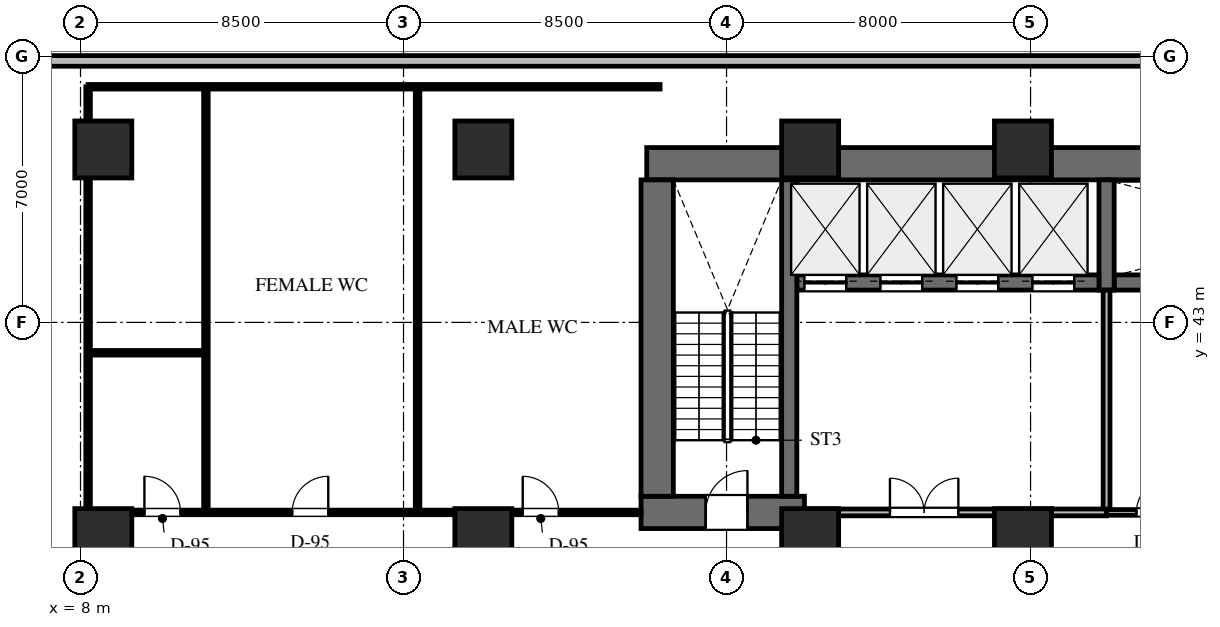
"""IFC4 building model, lengths in metres.
Left out: names, types, materials, properties, quantities, classifications, styles, units other than length and angle.
Written with IfcOpenShell. Run it as: python <this file> out.ifc"""

import sys

from ifc_helpers import new_model, si_unit, direction, frame, frame_2d, origin, origin_2d, place, context, subcontext, project, spatial, rectangle, extrude, element, fill, save


model = new_model("IFC4")
c1 = context("Model", 3, precision=1e-05, world=origin(), true_north=direction((0.0, 1.0)))
c2 = subcontext(c1, "Body", "Model", "MODEL_VIEW")
j1 = project(units=[si_unit("LENGTHUNIT", "METRE"), si_unit("PLANEANGLEUNIT", "RADIAN")], contexts=[c1])
p1 = place(None, origin())
s1 = spatial("IfcSite", under=j1, at=p1, CompositionType="ELEMENT")
p2 = place(p1, origin())
s2 = spatial("IfcBuilding", under=s1, at=p2, CompositionType="ELEMENT")
p3 = place(p2, frame((0.0, 0.0, 19.8)))
s3 = spatial("IfcBuildingStorey", under=s2, at=p3, CompositionType="ELEMENT", Elevation=19.8)
p4 = place(p3, frame((22.9, 47.175, 0.0), z_axis=(0.0, 0.0, 1.0), x_axis=(1.0, 0.0, 0.0)))
e1 = element("IfcWall", 1, at=p4, inside=s3, PredefinedType="SHEAR", context=c2, shape_type="SweptSolid", body=[
    extrude(rectangle(XDim=43.8, YDim=0.85, at=frame_2d((21.9, 0.0))), origin(), (0.0, 0.0, 1.0), 4.5),
])
p5 = place(p3, frame((35.2, 44.05, 0.0), z_axis=(0.0, 0.0, 1.0), x_axis=(1.0, 0.0, 0.0)))
e2 = element("IfcWall", 2, at=p5, inside=s3, PredefinedType="SHEAR", context=c2, shape_type="SweptSolid", body=[
    extrude(rectangle(XDim=9.65, YDim=0.4, at=frame_2d((4.825, 0.0))), origin(), (0.0, 0.0, 1.0), 4.5),
])
p6 = place(p3, frame((35.0, 43.85, 0.0), z_axis=(0.0, 0.0, 1.0), x_axis=(0.0, 1.0, 0.0)))
e3 = element("IfcWall", 3, at=p6, inside=s3, PredefinedType="SHEAR", context=c2, shape_type="SweptSolid", body=[
    extrude(rectangle(XDim=2.9, YDim=0.4, at=frame_2d((1.45, 0.0))), origin(), (0.0, 0.0, 1.0), 4.5),
])
p7 = place(p3, frame((26.85, 44.05, 0.0), z_axis=(0.0, 0.0, 1.0), x_axis=(1.0, 0.0, 0.0)))
e4 = element("IfcWall", 4, at=p7, inside=s3, PredefinedType="SHEAR", context=c2, shape_type="SweptSolid", body=[
    extrude(rectangle(XDim=7.95, YDim=0.4, at=frame_2d((3.975, 0.0))), origin(), (0.0, 0.0, 1.0), 4.5),
])
p8 = place(p7, frame((0.2, 0.0, 0.0)))
e5 = element("IfcOpeningElement", 5, at=p8, cuts=e4, PredefinedType="OPENING", context=c2, shape_type="SweptSolid", body=[
    extrude(rectangle(XDim=1.1, YDim=2.2, at=frame_2d((0.55, 1.1))), frame((0.0, 0.21, 0.0), z_axis=(0.0, -1.0, 0.0), x_axis=(1.0, 0.0, 0.0)), (0.0, 0.0, 1.0), 0.42),
])
p9 = place(p7, frame((2.2, 0.0, 0.0)))
e6 = element("IfcOpeningElement", 6, at=p9, cuts=e4, PredefinedType="OPENING", context=c2, shape_type="SweptSolid", body=[
    extrude(rectangle(XDim=1.1, YDim=2.2, at=frame_2d((0.55, 1.1))), frame((0.0, 0.21, 0.0), z_axis=(0.0, -1.0, 0.0), x_axis=(1.0, 0.0, 0.0)), (0.0, 0.0, 1.0), 0.42),
])
p10 = place(p7, frame((4.2, 0.0, 0.0)))
e7 = element("IfcOpeningElement", 7, at=p10, cuts=e4, PredefinedType="OPENING", context=c2, shape_type="SweptSolid", body=[
    extrude(rectangle(XDim=1.1, YDim=2.2, at=frame_2d((0.55, 1.1))), frame((0.0, 0.21, 0.0), z_axis=(0.0, -1.0, 0.0), x_axis=(1.0, 0.0, 0.0)), (0.0, 0.0, 1.0), 0.42),
])
p11 = place(p7, frame((6.2, 0.0, 0.0)))
e8 = element("IfcOpeningElement", 8, at=p11, cuts=e4, PredefinedType="OPENING", context=c2, shape_type="SweptSolid", body=[
    extrude(rectangle(XDim=1.1, YDim=2.2, at=frame_2d((0.55, 1.1))), frame((0.0, 0.21, 0.0), z_axis=(0.0, -1.0, 0.0), x_axis=(1.0, 0.0, 0.0)), (0.0, 0.0, 1.0), 0.42),
])
p12 = place(p3, frame((22.75, 38.0, 0.0), z_axis=(0.0, 0.0, 1.0), x_axis=(1.0, 0.0, 0.0)))
e9 = element("IfcWall", 9, at=p12, inside=s3, PredefinedType="SHEAR", context=c2, shape_type="SweptSolid", body=[
    extrude(rectangle(XDim=4.3, YDim=0.85, at=frame_2d((2.15, 0.0))), origin(), (0.0, 0.0, 1.0), 4.5),
])
p13 = place(p12, frame((1.7, 0.0, 0.0)))
e10 = element("IfcOpeningElement", 10, at=p13, cuts=e9, PredefinedType="OPENING", context=c2, shape_type="SweptSolid", body=[
    extrude(rectangle(XDim=1.1, YDim=2.2, at=frame_2d((0.55, 1.1))), frame((0.0, 0.435, 0.0), z_axis=(0.0, -1.0, 0.0), x_axis=(1.0, 0.0, 0.0)), (0.0, 0.0, 1.0), 0.87),
])
p14 = place(p3, frame((23.175, 38.425, 0.0), z_axis=(0.0, 0.0, 1.0), x_axis=(0.0, 1.0, 0.0)))
e11 = element("IfcWall", 11, at=p14, inside=s3, PredefinedType="SHEAR", context=c2, shape_type="SweptSolid", body=[
    extrude(rectangle(XDim=8.325, YDim=0.85, at=frame_2d((4.163, 0.0))), origin(), (0.0, 0.0, 1.0), 4.5),
])
p15 = place(p3, frame((26.65, 38.425, 0.0), z_axis=(0.0, 0.0, 1.0), x_axis=(0.0, 1.0, 0.0)))
e12 = element("IfcWall", 12, at=p15, inside=s3, PredefinedType="SHEAR", context=c2, shape_type="SweptSolid", body=[
    extrude(rectangle(XDim=8.325, YDim=0.4, at=frame_2d((4.163, 0.0))), origin(), (0.0, 0.0, 1.0), 4.5),
])
for number, where, z_axis, x_axis in (
    (13, (32.8, 37.35, 0.0), (0.0, 0.0, 1.0), (1.0, 0.0, 0.0)),
    (14, (32.8, 47.55, 0.0), (0.0, 0.0, 1.0), (1.0, 0.0, 0.0)),
    (15, (27.2, 37.35, 0.0), (0.0, 0.0, 1.0), (1.0, 0.0, 0.0)),
    (16, (27.2, 47.55, 0.0), (0.0, 0.0, 1.0), (1.0, 0.0, 0.0)),
    (17, (18.6, 37.35, 0.0), (0.0, 0.0, 1.0), (1.0, 0.0, 0.0)),
    (18, (18.6, 47.55, 0.0), (0.0, 0.0, 1.0), (1.0, 0.0, 0.0)),
    (19, (8.6, 37.35, 0.0), (0.0, 0.0, 1.0), (1.0, 0.0, 0.0)),
    (20, (8.6, 47.55, 0.0), (0.0, 0.0, 1.0), (1.0, 0.0, 0.0)),
):
    element("IfcColumn", number, at=place(p3, frame(where, z_axis=z_axis, x_axis=x_axis)), inside=s3, PredefinedType="COLUMN", context=c2, shape_type="SweptSolid", body=[
        extrude(rectangle(XDim=1.5, YDim=1.5, at=origin_2d()), origin(), (0.0, 0.0, 1.0), 4.5),
    ])
p16 = place(p3, frame((2.65, 49.88, 0.0), z_axis=(0.0, 0.0, 1.0), x_axis=(1.0, 0.0, 0.0)))
e21 = element("IfcWall", 21, at=p16, inside=s3, PredefinedType="STANDARD", context=c2, shape_type="SweptSolid", body=[
    extrude(rectangle(XDim=68.701, YDim=0.28, at=frame_2d((34.35, 0.0))), origin(), (0.0, 0.0, 1.0), 4.15),
])
p17 = place(p3, frame((35.0, 38.0, 0.0), z_axis=(0.0, 0.0, 1.0), x_axis=(0.0, 1.0, 0.0)))
e22 = element("IfcWall", 22, at=p17, inside=s3, PredefinedType="STANDARD", context=c2, shape_type="SweptSolid", body=[
    extrude(rectangle(XDim=5.85, YDim=0.18, at=frame_2d((2.925, 0.0))), origin(), (0.0, 0.0, 1.0), 4.15),
])
p18 = place(p3, frame((27.05, 38.0, 0.0), z_axis=(0.0, 0.0, 1.0), x_axis=(1.0, 0.0, 0.0)))
e23 = element("IfcWall", 23, at=p18, inside=s3, PredefinedType="STANDARD", context=c2, shape_type="SweptSolid", body=[
    extrude(rectangle(XDim=7.95, YDim=0.18, at=frame_2d((3.975, 0.0))), origin(), (0.0, 0.0, 1.0), 3.202),
])
p19 = place(p18, frame((2.25, 0.0, 0.0)))
e24 = element("IfcOpeningElement", 24, at=p19, cuts=e23, PredefinedType="OPENING", context=c2, shape_type="SweptSolid", body=[
    extrude(rectangle(XDim=1.8, YDim=2.2, at=frame_2d((0.9, 1.1))), frame((0.0, 0.1, 0.0), z_axis=(0.0, -1.0, 0.0), x_axis=(1.0, 0.0, 0.0)), (0.0, 0.0, 1.0), 0.2),
])
p20 = place(p3, frame((35.0, 38.0, 0.0), z_axis=(0.0, 0.0, 1.0), x_axis=(1.0, 0.0, 0.0)))
e25 = element("IfcWall", 25, at=p20, inside=s3, PredefinedType="PARTITIONING", context=c2, shape_type="SweptSolid", body=[
    extrude(rectangle(XDim=10.05, YDim=0.15, at=frame_2d((5.025, 0.0))), origin(), (0.0, 0.0, 1.0), 3.202),
])
p21 = place(p20, frame((0.785, 0.0, 0.0)))
e26 = element("IfcOpeningElement", 26, at=p21, cuts=e25, PredefinedType="OPENING", context=c2, shape_type="SweptSolid", body=[
    extrude(rectangle(XDim=0.9, YDim=2.1, at=frame_2d((0.45, 1.05))), frame((0.0, 0.085, 0.0), z_axis=(0.0, -1.0, 0.0), x_axis=(1.0, 0.0, 0.0)), (0.0, 0.0, 1.0), 0.17),
])
p22 = place(p20, frame((5.3, 0.0, 0.0)))
e27 = element("IfcOpeningElement", 27, at=p22, cuts=e25, PredefinedType="OPENING", context=c2, shape_type="SweptSolid", body=[
    extrude(rectangle(XDim=0.9, YDim=2.1, at=frame_2d((0.45, 1.05))), frame((0.0, 0.085, 0.0), z_axis=(0.0, -1.0, 0.0), x_axis=(1.0, 0.0, 0.0)), (0.0, 0.0, 1.0), 0.17),
])
p23 = place(p20, frame((7.2, 0.0, 0.0)))
e28 = element("IfcOpeningElement", 28, at=p23, cuts=e25, PredefinedType="OPENING", context=c2, shape_type="SweptSolid", body=[
    extrude(rectangle(XDim=0.9, YDim=2.1, at=frame_2d((0.45, 1.05))), frame((0.0, 0.085, 0.0), z_axis=(0.0, -1.0, 0.0), x_axis=(1.0, 0.0, 0.0)), (0.0, 0.0, 1.0), 0.17),
])
p24 = place(p3, frame((8.2, 38.0, 0.0), z_axis=(0.0, 0.0, 1.0), x_axis=(1.0, 0.0, 0.0)))
e29 = element("IfcWall", 29, at=p24, inside=s3, PredefinedType="PARTITIONING", context=c2, shape_type="SweptSolid", body=[
    extrude(rectangle(XDim=14.55, YDim=0.12, at=frame_2d((7.275, 0.0))), origin(), (0.0, 0.0, 1.0), 3.202),
])
p25 = place(p24, frame((1.482, 0.0, 0.0)))
e30 = element("IfcOpeningElement", 30, at=p25, cuts=e29, PredefinedType="OPENING", context=c2, shape_type="SweptSolid", body=[
    extrude(rectangle(XDim=0.95, YDim=2.15, at=frame_2d((0.475, 1.075))), frame((0.0, 0.07, 0.0), z_axis=(0.0, -1.0, 0.0), x_axis=(1.0, 0.0, 0.0)), (0.0, 0.0, 1.0), 0.14),
])
p26 = place(p24, frame((5.37, 0.0, 0.0)))
e31 = element("IfcOpeningElement", 31, at=p26, cuts=e29, PredefinedType="OPENING", context=c2, shape_type="SweptSolid", body=[
    extrude(rectangle(XDim=0.95, YDim=2.15, at=frame_2d((0.475, 1.075))), frame((0.0, 0.07, 0.0), z_axis=(0.0, -1.0, 0.0), x_axis=(1.0, 0.0, 0.0)), (0.0, 0.0, 1.0), 0.14),
])
p27 = place(p24, frame((11.437, 0.0, 0.0)))
e32 = element("IfcOpeningElement", 32, at=p27, cuts=e29, PredefinedType="OPENING", context=c2, shape_type="SweptSolid", body=[
    extrude(rectangle(XDim=0.95, YDim=2.15, at=frame_2d((0.475, 1.075))), frame((0.0, 0.07, 0.0), z_axis=(0.0, -1.0, 0.0), x_axis=(1.0, 0.0, 0.0)), (0.0, 0.0, 1.0), 0.14),
])
p28 = place(p3, frame((8.2, 38.0, 0.0), z_axis=(0.0, 0.0, 1.0), x_axis=(0.0, 1.0, 0.0)))
e33 = element("IfcWall", 33, at=p28, inside=s3, PredefinedType="PARTITIONING", context=c2, shape_type="SweptSolid", body=[
    extrude(rectangle(XDim=11.2, YDim=0.12, at=frame_2d((5.6, 0.0))), origin(), (0.0, 0.0, 1.0), 4.15),
])
p29 = place(p3, frame((8.2, 49.2, 0.0), z_axis=(0.0, 0.0, 1.0), x_axis=(1.0, 0.0, 0.0)))
e34 = element("IfcWall", 34, at=p29, inside=s3, PredefinedType="PARTITIONING", context=c2, shape_type="SweptSolid", body=[
    extrude(rectangle(XDim=15.05, YDim=0.12, at=frame_2d((7.525, 0.0))), origin(), (0.0, 0.0, 1.0), 4.15),
])
for number, where, z_axis, x_axis in (
    (35, (11.3, 38.068, 0.0), (0.0, 0.0, 1.0), (0.0, 1.0, 0.0)),
    (36, (16.87, 38.068, 0.0), (0.0, 0.0, 1.0), (0.0, 1.0, 0.0)),
):
    element("IfcWall", number, at=place(p3, frame(where, z_axis=z_axis, x_axis=x_axis)), inside=s3, PredefinedType="PARTITIONING", context=c2, shape_type="SweptSolid", body=[
        extrude(rectangle(XDim=11.064, YDim=0.12, at=frame_2d((5.532, 0.0))), origin(), (0.0, 0.0, 1.0), 3.202),
    ])
p30 = place(p3, frame((8.268, 42.2, 0.0), z_axis=(0.0, 0.0, 1.0), x_axis=(1.0, 0.0, 0.0)))
e37 = element("IfcWall", 37, at=p30, inside=s3, PredefinedType="PARTITIONING", context=c2, shape_type="SweptSolid", body=[
    extrude(rectangle(XDim=2.964, YDim=0.12, at=frame_2d((1.482, 0.0))), origin(), (0.0, 0.0, 1.0), 3.202),
])
p31 = place(p13, origin())
e38 = element("IfcDoor", 38, at=p31, inside=s3, OperationType="SINGLE_SWING_RIGHT", PredefinedType="DOOR", context=c2, shape_type="SweptSolid", body=[
    extrude(rectangle(XDim=1.1, YDim=2.2, at=frame_2d((0.55, 1.1))), frame((0.0, 0.025, 0.0), z_axis=(0.0, -1.0, 0.0), x_axis=(1.0, 0.0, 0.0)), (0.0, 0.0, 1.0), 0.05),
])
fill(e10, e38)
p32 = place(p8, origin())
e39 = element("IfcDoor", 39, at=p32, inside=s3, OperationType="DOUBLE_DOOR_SLIDING", PredefinedType="DOOR", context=c2, shape_type="SweptSolid", body=[
    extrude(rectangle(XDim=1.1, YDim=2.2, at=frame_2d((0.55, 1.1))), frame((0.0, 0.025, 0.0), z_axis=(0.0, -1.0, 0.0), x_axis=(1.0, 0.0, 0.0)), (0.0, 0.0, 1.0), 0.05),
])
fill(e5, e39)
p33 = place(p9, origin())
e40 = element("IfcDoor", 40, at=p33, inside=s3, OperationType="DOUBLE_DOOR_SLIDING", PredefinedType="DOOR", context=c2, shape_type="SweptSolid", body=[
    extrude(rectangle(XDim=1.1, YDim=2.2, at=frame_2d((0.55, 1.1))), frame((0.0, 0.025, 0.0), z_axis=(0.0, -1.0, 0.0), x_axis=(1.0, 0.0, 0.0)), (0.0, 0.0, 1.0), 0.05),
])
fill(e6, e40)
p34 = place(p10, origin())
e41 = element("IfcDoor", 41, at=p34, inside=s3, OperationType="DOUBLE_DOOR_SLIDING", PredefinedType="DOOR", context=c2, shape_type="SweptSolid", body=[
    extrude(rectangle(XDim=1.1, YDim=2.2, at=frame_2d((0.55, 1.1))), frame((0.0, 0.025, 0.0), z_axis=(0.0, -1.0, 0.0), x_axis=(1.0, 0.0, 0.0)), (0.0, 0.0, 1.0), 0.05),
])
fill(e7, e41)
p35 = place(p11, origin())
e42 = element("IfcDoor", 42, at=p35, inside=s3, OperationType="DOUBLE_DOOR_SLIDING", PredefinedType="DOOR", context=c2, shape_type="SweptSolid", body=[
    extrude(rectangle(XDim=1.1, YDim=2.2, at=frame_2d((0.55, 1.1))), frame((0.0, 0.025, 0.0), z_axis=(0.0, -1.0, 0.0), x_axis=(1.0, 0.0, 0.0)), (0.0, 0.0, 1.0), 0.05),
])
fill(e8, e42)
p36 = place(p19, origin())
e43 = element("IfcDoor", 43, at=p36, inside=s3, OperationType="DOUBLE_DOOR_SINGLE_SWING", PredefinedType="DOOR", context=c2, shape_type="SweptSolid", body=[
    extrude(rectangle(XDim=1.8, YDim=2.2, at=frame_2d((0.9, 1.1))), frame((0.0, 0.025, 0.0), z_axis=(0.0, -1.0, 0.0), x_axis=(1.0, 0.0, 0.0)), (0.0, 0.0, 1.0), 0.05),
])
fill(e24, e43)
p37 = place(p21, origin())
e44 = element("IfcDoor", 44, at=p37, inside=s3, OperationType="SINGLE_SWING_RIGHT", PredefinedType="DOOR", context=c2, shape_type="SweptSolid", body=[
    extrude(rectangle(XDim=0.9, YDim=2.1, at=frame_2d((0.45, 1.05))), frame((0.0, 0.025, 0.0), z_axis=(0.0, -1.0, 0.0), x_axis=(1.0, 0.0, 0.0)), (0.0, 0.0, 1.0), 0.05),
])
fill(e26, e44)
p38 = place(p25, origin())
e45 = element("IfcDoor", 45, at=p38, inside=s3, OperationType="SINGLE_SWING_LEFT", PredefinedType="DOOR", context=c2, shape_type="SweptSolid", body=[
    extrude(rectangle(XDim=0.95, YDim=2.15, at=frame_2d((0.475, 1.075))), frame((0.0, 0.025, 0.0), z_axis=(0.0, -1.0, 0.0), x_axis=(1.0, 0.0, 0.0)), (0.0, 0.0, 1.0), 0.05),
])
fill(e30, e45)
p39 = place(p26, origin())
e46 = element("IfcDoor", 46, at=p39, inside=s3, OperationType="SINGLE_SWING_RIGHT", PredefinedType="DOOR", context=c2, shape_type="SweptSolid", body=[
    extrude(rectangle(XDim=0.95, YDim=2.15, at=frame_2d((0.475, 1.075))), frame((0.0, 0.025, 0.0), z_axis=(0.0, -1.0, 0.0), x_axis=(1.0, 0.0, 0.0)), (0.0, 0.0, 1.0), 0.05),
])
fill(e31, e46)
p40 = place(p27, origin())
e47 = element("IfcDoor", 47, at=p40, inside=s3, OperationType="SINGLE_SWING_LEFT", PredefinedType="DOOR", context=c2, shape_type="SweptSolid", body=[
    extrude(rectangle(XDim=0.95, YDim=2.15, at=frame_2d((0.475, 1.075))), frame((0.0, 0.025, 0.0), z_axis=(0.0, -1.0, 0.0), x_axis=(1.0, 0.0, 0.0)), (0.0, 0.0, 1.0), 0.05),
])
fill(e32, e47)
save(model, sys.argv[1])
